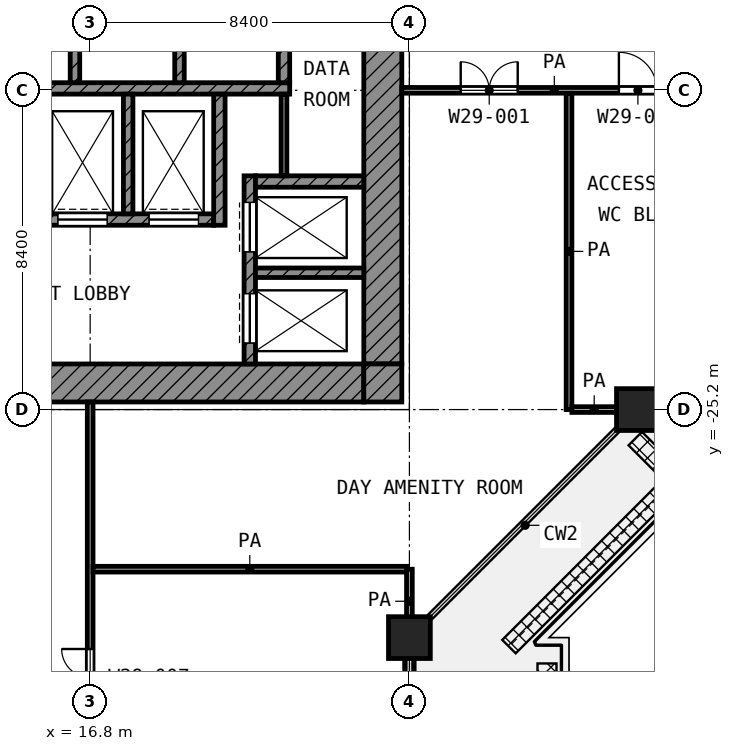
"""IFC4 building model, lengths in metres.
Left out: names, types, materials, properties, quantities, classifications, styles, units other than length and angle.
Written with IfcOpenShell. Run it as: python <this file> out.ifc"""

import sys

from ifc_helpers import new_model, si_unit, direction, frame, frame_2d, origin, origin_2d, place, context, subcontext, project, spatial, rectangle, extrude, element, fill, save


model = new_model("IFC4")
c1 = context("Model", 3, precision=1e-05, world=origin(), true_north=direction((0.0, 1.0)))
c2 = subcontext(c1, "Body", "Model", "MODEL_VIEW")
j1 = project(units=[si_unit("LENGTHUNIT", "METRE"), si_unit("PLANEANGLEUNIT", "RADIAN")], contexts=[c1])
p1 = place(None, origin())
s1 = spatial("IfcSite", under=j1, at=p1, CompositionType="ELEMENT")
p2 = place(p1, origin())
s2 = spatial("IfcBuilding", under=s1, at=p2, CompositionType="ELEMENT")
p3 = place(p2, frame((0.0, 0.0, 149.2)))
s3 = spatial("IfcBuildingStorey", under=s2, at=p3, CompositionType="ELEMENT", Elevation=149.2)
for number, where, z_axis, x_axis in (
    (1, (31.2, -25.2, 0.0), (0.0, 0.0, 1.0), (1.0, 0.0, 0.0)),
    (2, (25.2, -31.2, 0.0), (0.0, 0.0, 1.0), (1.0, 0.0, 0.0)),
):
    element("IfcColumn", number, at=place(p3, frame(where, z_axis=z_axis, x_axis=x_axis)), inside=s3, PredefinedType="COLUMN", context=c2, shape_type="SweptSolid", body=[
        extrude(rectangle(XDim=1.1, YDim=1.1, at=origin_2d()), origin(), (0.0, 0.0, 1.0), 4.2),
    ])
p4 = place(p3, frame((25.2, -34.992, 0.0), z_axis=(0.0, 0.0, 1.0), x_axis=(0.0, 1.0, 0.0)))
e3 = element("IfcWall", 3, at=p4, inside=s3, PredefinedType="SOLIDWALL", context=c2, shape_type="SweptSolid", body=[
    extrude(rectangle(XDim=3.242, YDim=0.25, at=frame_2d((1.621, 0.0))), origin(), (0.0, 0.0, 1.0), 3.58),
])
p5 = place(p4, frame((0.721, 0.0, 0.0)))
e4 = element("IfcOpeningElement", 4, at=p5, cuts=e3, PredefinedType="OPENING", context=c2, shape_type="SweptSolid", body=[
    extrude(rectangle(XDim=1.8, YDim=2.1, at=frame_2d((0.9, 1.05))), frame((0.0, 0.135, 0.0), z_axis=(0.0, -1.0, 0.0), x_axis=(1.0, 0.0, 0.0)), (0.0, 0.0, 1.0), 0.27),
])
p6 = place(p3, frame((24.5, -24.0, 0.0), z_axis=(0.0, 0.0, 1.0), x_axis=(0.0, 1.0, 0.0)))
e5 = element("IfcWall", 5, at=p6, inside=s3, PredefinedType="SHEAR", context=c2, shape_type="SweptSolid", body=[
    extrude(rectangle(XDim=18.6, YDim=1.0, at=frame_2d((9.3, 0.0))), origin(), (0.0, 0.0, 1.0), 3.7),
])
p7 = place(p6, frame((10.5, 0.0, 0.0)))
e6 = element("IfcOpeningElement", 6, at=p7, cuts=e5, PredefinedType="OPENING", context=c2, shape_type="SweptSolid", body=[
    extrude(rectangle(XDim=1.8, YDim=2.1, at=frame_2d((0.9, 1.05))), frame((0.0, 0.51, 0.0), z_axis=(0.0, -1.0, 0.0), x_axis=(1.0, 0.0, 0.0)), (0.0, 0.0, 1.0), 1.02),
])
p8 = place(p3, frame((5.4, -24.5, 0.0), z_axis=(0.0, 0.0, 1.0), x_axis=(1.0, 0.0, 0.0)))
e7 = element("IfcWall", 7, at=p8, inside=s3, PredefinedType="SHEAR", context=c2, shape_type="SweptSolid", body=[
    extrude(rectangle(XDim=18.6, YDim=1.0, at=frame_2d((9.3, 0.0))), origin(), (0.0, 0.0, 1.0), 3.7),
])
p9 = place(p8, frame((6.3, 0.0, 0.0)))
e8 = element("IfcOpeningElement", 8, at=p9, cuts=e7, PredefinedType="OPENING", context=c2, shape_type="SweptSolid", body=[
    extrude(rectangle(XDim=1.8, YDim=2.1, at=frame_2d((0.9, 1.05))), frame((0.0, 0.51, 0.0), z_axis=(0.0, -1.0, 0.0), x_axis=(1.0, 0.0, 0.0)), (0.0, 0.0, 1.0), 1.02),
])
p10 = place(p3, frame((24.5, -25.0, 0.0), z_axis=(0.0, 0.0, 1.0), x_axis=(0.0, 1.0, 0.0)))
e9 = element("IfcWall", 9, at=p10, inside=s3, PredefinedType="SHEAR", context=c2, shape_type="SweptSolid", body=[
    extrude(rectangle(XDim=1.0, YDim=1.0, at=frame_2d((0.5, 0.0))), origin(), (0.0, 0.0, 1.0), 3.7),
])
p11 = place(p3, frame((5.4, -16.75, 0.0), z_axis=(0.0, 0.0, 1.0), x_axis=(1.0, 0.0, 0.0)))
e10 = element("IfcWall", 10, at=p11, inside=s3, PredefinedType="SHEAR", context=c2, shape_type="SweptSolid", body=[
    extrude(rectangle(XDim=16.65, YDim=0.3, at=frame_2d((8.325, 0.0))), origin(), (0.0, 0.0, 1.0), 3.7),
])
p12 = place(p3, frame((5.4, -20.2, 0.0), z_axis=(0.0, 0.0, 1.0), x_axis=(1.0, 0.0, 0.0)))
e11 = element("IfcWall", 11, at=p12, inside=s3, PredefinedType="SHEAR", context=c2, shape_type="SweptSolid", body=[
    extrude(rectangle(XDim=14.65, YDim=0.3, at=frame_2d((7.325, 0.0))), origin(), (0.0, 0.0, 1.0), 3.7),
])
p13 = place(p12, frame((10.55, 0.0, 0.0)))
e12 = element("IfcOpeningElement", 12, at=p13, cuts=e11, PredefinedType="OPENING", context=c2, shape_type="SweptSolid", body=[
    extrude(rectangle(XDim=1.3, YDim=2.1, at=frame_2d((0.65, 1.05))), frame((0.0, 0.16, 0.0), z_axis=(0.0, -1.0, 0.0), x_axis=(1.0, 0.0, 0.0)), (0.0, 0.0, 1.0), 0.32),
])
p14 = place(p12, frame((12.95, 0.0, 0.0)))
e13 = element("IfcOpeningElement", 13, at=p14, cuts=e11, PredefinedType="OPENING", context=c2, shape_type="SweptSolid", body=[
    extrude(rectangle(XDim=1.3, YDim=2.1, at=frame_2d((0.65, 1.05))), frame((0.0, 0.16, 0.0), z_axis=(0.0, -1.0, 0.0), x_axis=(1.0, 0.0, 0.0)), (0.0, 0.0, 1.0), 0.32),
])
p15 = place(p12, frame((0.55, 0.0, 0.0)))
e14 = element("IfcOpeningElement", 14, at=p15, cuts=e11, PredefinedType="OPENING", context=c2, shape_type="SweptSolid", body=[
    extrude(rectangle(XDim=1.3, YDim=2.1, at=frame_2d((0.65, 1.05))), frame((0.0, 0.16, 0.0), z_axis=(0.0, -1.0, 0.0), x_axis=(1.0, 0.0, 0.0)), (0.0, 0.0, 1.0), 0.32),
])
p16 = place(p12, frame((2.95, 0.0, 0.0)))
e15 = element("IfcOpeningElement", 15, at=p16, cuts=e11, PredefinedType="OPENING", context=c2, shape_type="SweptSolid", body=[
    extrude(rectangle(XDim=1.3, YDim=2.1, at=frame_2d((0.65, 1.05))), frame((0.0, 0.16, 0.0), z_axis=(0.0, -1.0, 0.0), x_axis=(1.0, 0.0, 0.0)), (0.0, 0.0, 1.0), 0.32),
])
p17 = place(p12, frame((5.35, 0.0, 0.0)))
e16 = element("IfcOpeningElement", 16, at=p17, cuts=e11, PredefinedType="OPENING", context=c2, shape_type="SweptSolid", body=[
    extrude(rectangle(XDim=0.9, YDim=2.1, at=frame_2d((0.45, 1.05))), frame((0.0, 0.16, 0.0), z_axis=(0.0, -1.0, 0.0), x_axis=(1.0, 0.0, 0.0)), (0.0, 0.0, 1.0), 0.32),
])
p18 = place(p12, frame((7.75, 0.0, 0.0)))
e17 = element("IfcOpeningElement", 17, at=p18, cuts=e11, PredefinedType="OPENING", context=c2, shape_type="SweptSolid", body=[
    extrude(rectangle(XDim=0.9, YDim=2.1, at=frame_2d((0.45, 1.05))), frame((0.0, 0.16, 0.0), z_axis=(0.0, -1.0, 0.0), x_axis=(1.0, 0.0, 0.0)), (0.0, 0.0, 1.0), 0.32),
])
p19 = place(p3, frame((20.2, -20.35, 0.0), z_axis=(0.0, 0.0, 1.0), x_axis=(0.0, 1.0, 0.0)))
e18 = element("IfcWall", 18, at=p19, inside=s3, PredefinedType="SHEAR", context=c2, shape_type="SweptSolid", body=[
    extrude(rectangle(XDim=3.45, YDim=0.3, at=frame_2d((1.725, 0.0))), origin(), (0.0, 0.0, 1.0), 3.7),
])
p20 = place(p3, frame((21.9, -16.6, 0.0), z_axis=(0.0, 0.0, 1.0), x_axis=(0.0, 1.0, 0.0)))
e19 = element("IfcWall", 19, at=p20, inside=s3, PredefinedType="SHEAR", context=c2, shape_type="SweptSolid", body=[
    extrude(rectangle(XDim=2.35, YDim=0.3, at=frame_2d((1.175, 0.0))), origin(), (0.0, 0.0, 1.0), 3.7),
])
p21 = place(p3, frame((21.15, -19.2, 0.0), z_axis=(0.0, 0.0, 1.0), x_axis=(1.0, 0.0, 0.0)))
e20 = element("IfcWall", 20, at=p21, inside=s3, PredefinedType="SHEAR", context=c2, shape_type="SweptSolid", body=[
    extrude(rectangle(XDim=2.85, YDim=0.3, at=frame_2d((1.425, 0.0))), origin(), (0.0, 0.0, 1.0), 3.7),
])
p22 = place(p3, frame((21.0, -24.0, 0.0), z_axis=(0.0, 0.0, 1.0), x_axis=(0.0, 1.0, 0.0)))
e21 = element("IfcWall", 21, at=p22, inside=s3, PredefinedType="SHEAR", context=c2, shape_type="SweptSolid", body=[
    extrude(rectangle(XDim=4.95, YDim=0.3, at=frame_2d((2.475, 0.0))), origin(), (0.0, 0.0, 1.0), 3.7),
])
p23 = place(p22, frame((2.95, 0.0, 0.0)))
e22 = element("IfcOpeningElement", 22, at=p23, cuts=e21, PredefinedType="OPENING", context=c2, shape_type="SweptSolid", body=[
    extrude(rectangle(XDim=1.3, YDim=2.1, at=frame_2d((0.65, 1.05))), frame((0.0, 0.16, 0.0), z_axis=(0.0, -1.0, 0.0), x_axis=(1.0, 0.0, 0.0)), (0.0, 0.0, 1.0), 0.32),
])
p24 = place(p22, frame((0.55, 0.0, 0.0)))
e23 = element("IfcOpeningElement", 23, at=p24, cuts=e21, PredefinedType="OPENING", context=c2, shape_type="SweptSolid", body=[
    extrude(rectangle(XDim=1.3, YDim=2.1, at=frame_2d((0.65, 1.05))), frame((0.0, 0.16, 0.0), z_axis=(0.0, -1.0, 0.0), x_axis=(1.0, 0.0, 0.0)), (0.0, 0.0, 1.0), 0.32),
])
p25 = place(p3, frame((21.15, -21.6, 0.0), z_axis=(0.0, 0.0, 1.0), x_axis=(1.0, 0.0, 0.0)))
e24 = element("IfcWall", 24, at=p25, inside=s3, PredefinedType="SHEAR", context=c2, shape_type="SweptSolid", body=[
    extrude(rectangle(XDim=2.85, YDim=0.25, at=frame_2d((1.425, 0.0))), origin(), (0.0, 0.0, 1.0), 3.7),
])
p26 = place(p3, frame((17.8, -20.05, 0.0), z_axis=(0.0, 0.0, 1.0), x_axis=(0.0, 1.0, 0.0)))
e25 = element("IfcWall", 25, at=p26, inside=s3, PredefinedType="SHEAR", context=c2, shape_type="SweptSolid", body=[
    extrude(rectangle(XDim=3.15, YDim=0.25, at=frame_2d((1.575, 0.0))), origin(), (0.0, 0.0, 1.0), 3.7),
])
for number, where, z_axis, x_axis in (
    (26, (16.4, -16.6, 0.0), (0.0, 0.0, 1.0), (0.0, 1.0, 0.0)),
    (27, (19.15, -16.6, 0.0), (0.0, 0.0, 1.0), (0.0, 1.0, 0.0)),
):
    element("IfcWall", number, at=place(p3, frame(where, z_axis=z_axis, x_axis=x_axis)), inside=s3, PredefinedType="SHEAR", context=c2, shape_type="SweptSolid", body=[
        extrude(rectangle(XDim=2.35, YDim=0.25, at=frame_2d((1.175, 0.0))), origin(), (0.0, 0.0, 1.0), 3.7),
    ])
p27 = place(p3, frame((21.9, -19.05, 0.0), z_axis=(0.0, 0.0, 1.0), x_axis=(0.0, 1.0, 0.0)))
e28 = element("IfcWall", 28, at=p27, inside=s3, PredefinedType="PARTITIONING", context=c2, shape_type="SweptSolid", body=[
    extrude(rectangle(XDim=2.15, YDim=0.15, at=frame_2d((1.075, 0.0))), origin(), (0.0, 0.0, 1.0), 3.7),
])
p28 = place(p3, frame((16.875, -29.4, 0.0), z_axis=(0.0, 0.0, 1.0), x_axis=(1.0, 0.0, 0.0)))
e29 = element("IfcWall", 29, at=p28, inside=s3, PredefinedType="PARTITIONING", context=c2, shape_type="SweptSolid", body=[
    extrude(rectangle(XDim=8.25, YDim=0.15, at=frame_2d((4.125, 0.0))), origin(), (0.0, 0.0, 1.0), 3.7),
])
p29 = place(p3, frame((29.475, -25.2, 0.0), z_axis=(0.0, 0.0, 1.0), x_axis=(1.0, 0.0, 0.0)))
e30 = element("IfcWall", 30, at=p29, inside=s3, PredefinedType="PARTITIONING", context=c2, shape_type="SweptSolid", body=[
    extrude(rectangle(XDim=1.175, YDim=0.15, at=frame_2d((0.587, 0.0))), origin(), (0.0, 0.0, 1.0), 3.7),
])
p30 = place(p3, frame((25.0, -16.8, 0.0), z_axis=(0.0, 0.0, 1.0), x_axis=(1.0, 0.0, 0.0)))
e31 = element("IfcWall", 31, at=p30, inside=s3, PredefinedType="PARTITIONING", context=c2, shape_type="SweptSolid", body=[
    extrude(rectangle(XDim=8.025, YDim=0.15, at=frame_2d((4.012, 0.0))), origin(), (0.0, 0.0, 1.0), 3.7),
])
p31 = place(p30, frame((1.55, 0.0, 0.0)))
e32 = element("IfcOpeningElement", 32, at=p31, cuts=e31, PredefinedType="OPENING", context=c2, shape_type="SweptSolid", body=[
    extrude(rectangle(XDim=1.5, YDim=2.1, at=frame_2d((0.75, 1.05))), frame((0.0, 0.085, 0.0), z_axis=(0.0, -1.0, 0.0), x_axis=(1.0, 0.0, 0.0)), (0.0, 0.0, 1.0), 0.17),
])
p32 = place(p30, frame((5.712, 0.0, 0.0)))
e33 = element("IfcOpeningElement", 33, at=p32, cuts=e31, PredefinedType="OPENING", context=c2, shape_type="SweptSolid", body=[
    extrude(rectangle(XDim=1.0, YDim=2.1, at=frame_2d((0.5, 1.05))), frame((0.0, 0.085, 0.0), z_axis=(0.0, -1.0, 0.0), x_axis=(1.0, 0.0, 0.0)), (0.0, 0.0, 1.0), 0.17),
])
p33 = place(p3, frame((16.8, -58.72, 0.0), z_axis=(0.0, 0.0, 1.0), x_axis=(0.0, 1.0, 0.0)))
e34 = element("IfcWall", 34, at=p33, inside=s3, PredefinedType="PARTITIONING", context=c2, shape_type="SweptSolid", body=[
    extrude(rectangle(XDim=33.72, YDim=0.15, at=frame_2d((16.86, 0.0))), origin(), (0.0, 0.0, 1.0), 3.7),
])
p34 = place(p33, frame((25.72, 0.0, 0.0)))
e35 = element("IfcOpeningElement", 35, at=p34, cuts=e34, PredefinedType="OPENING", context=c2, shape_type="SweptSolid", body=[
    extrude(rectangle(XDim=1.5, YDim=2.1, at=frame_2d((0.75, 1.05))), frame((0.0, 0.085, 0.0), z_axis=(0.0, -1.0, 0.0), x_axis=(1.0, 0.0, 0.0)), (0.0, 0.0, 1.0), 0.17),
])
p35 = place(p33, frame((17.72, 0.0, 0.0)))
e36 = element("IfcOpeningElement", 36, at=p35, cuts=e34, PredefinedType="OPENING", context=c2, shape_type="SweptSolid", body=[
    extrude(rectangle(XDim=1.2, YDim=2.1, at=frame_2d((0.6, 1.05))), frame((0.0, 0.085, 0.0), z_axis=(0.0, -1.0, 0.0), x_axis=(1.0, 0.0, 0.0)), (0.0, 0.0, 1.0), 0.17),
])
p36 = place(p33, frame((14.92, 0.0, 0.0)))
e37 = element("IfcOpeningElement", 37, at=p36, cuts=e34, PredefinedType="OPENING", context=c2, shape_type="SweptSolid", body=[
    extrude(rectangle(XDim=1.2, YDim=2.1, at=frame_2d((0.6, 1.05))), frame((0.0, 0.085, 0.0), z_axis=(0.0, -1.0, 0.0), x_axis=(1.0, 0.0, 0.0)), (0.0, 0.0, 1.0), 0.17),
])
p37 = place(p33, frame((9.02, 0.0, 0.0)))
e38 = element("IfcOpeningElement", 38, at=p37, cuts=e34, PredefinedType="OPENING", context=c2, shape_type="SweptSolid", body=[
    extrude(rectangle(XDim=0.9, YDim=2.1, at=frame_2d((0.45, 1.05))), frame((0.0, 0.085, 0.0), z_axis=(0.0, -1.0, 0.0), x_axis=(1.0, 0.0, 0.0)), (0.0, 0.0, 1.0), 0.17),
])
p38 = place(p33, frame((3.37, 0.0, 0.0)))
e39 = element("IfcOpeningElement", 39, at=p38, cuts=e34, PredefinedType="OPENING", context=c2, shape_type="SweptSolid", body=[
    extrude(rectangle(XDim=1.5, YDim=2.1, at=frame_2d((0.75, 1.05))), frame((0.0, 0.085, 0.0), z_axis=(0.0, -1.0, 0.0), x_axis=(1.0, 0.0, 0.0)), (0.0, 0.0, 1.0), 0.17),
])
p39 = place(p3, frame((25.2, -31.087, 0.0), z_axis=(0.0, 0.0, 1.0), x_axis=(0.0, 1.0, 0.0)))
e40 = element("IfcWall", 40, at=p39, inside=s3, PredefinedType="PARTITIONING", context=c2, shape_type="SweptSolid", body=[
    extrude(rectangle(XDim=1.687, YDim=0.15, at=frame_2d((0.844, 0.0))), origin(), (0.0, 0.0, 1.0), 3.7),
])
p40 = place(p3, frame((29.4, -25.2, 0.0), z_axis=(0.0, 0.0, 1.0), x_axis=(0.0, 1.0, 0.0)))
e41 = element("IfcWall", 41, at=p40, inside=s3, PredefinedType="PARTITIONING", context=c2, shape_type="SweptSolid", body=[
    extrude(rectangle(XDim=8.325, YDim=0.15, at=frame_2d((4.163, 0.0))), origin(), (0.0, 0.0, 1.0), 3.7),
])
p41 = place(p23, origin())
e42 = element("IfcDoor", 42, at=p41, inside=s3, OperationType="DOUBLE_DOOR_SLIDING", PredefinedType="DOOR", context=c2, shape_type="SweptSolid", body=[
    extrude(rectangle(XDim=1.3, YDim=2.1, at=frame_2d((0.65, 1.05))), frame((0.0, 0.025, 0.0), z_axis=(0.0, -1.0, 0.0), x_axis=(1.0, 0.0, 0.0)), (0.0, 0.0, 1.0), 0.05),
])
fill(e22, e42)
p42 = place(p24, origin())
e43 = element("IfcDoor", 43, at=p42, inside=s3, OperationType="DOUBLE_DOOR_SLIDING", PredefinedType="DOOR", context=c2, shape_type="SweptSolid", body=[
    extrude(rectangle(XDim=1.3, YDim=2.1, at=frame_2d((0.65, 1.05))), frame((0.0, 0.025, 0.0), z_axis=(0.0, -1.0, 0.0), x_axis=(1.0, 0.0, 0.0)), (0.0, 0.0, 1.0), 0.05),
])
fill(e23, e43)
p43 = place(p13, origin())
e44 = element("IfcDoor", 44, at=p43, inside=s3, OperationType="DOUBLE_DOOR_SLIDING", PredefinedType="DOOR", context=c2, shape_type="SweptSolid", body=[
    extrude(rectangle(XDim=1.3, YDim=2.1, at=frame_2d((0.65, 1.05))), frame((0.0, 0.025, 0.0), z_axis=(0.0, -1.0, 0.0), x_axis=(1.0, 0.0, 0.0)), (0.0, 0.0, 1.0), 0.05),
])
fill(e12, e44)
p44 = place(p14, origin())
e45 = element("IfcDoor", 45, at=p44, inside=s3, OperationType="DOUBLE_DOOR_SLIDING", PredefinedType="DOOR", context=c2, shape_type="SweptSolid", body=[
    extrude(rectangle(XDim=1.3, YDim=2.1, at=frame_2d((0.65, 1.05))), frame((0.0, 0.025, 0.0), z_axis=(0.0, -1.0, 0.0), x_axis=(1.0, 0.0, 0.0)), (0.0, 0.0, 1.0), 0.05),
])
fill(e13, e45)
p45 = place(p31, origin())
e46 = element("IfcDoor", 46, at=p45, inside=s3, OperationType="DOUBLE_DOOR_SINGLE_SWING", PredefinedType="DOOR", context=c2, shape_type="SweptSolid", body=[
    extrude(rectangle(XDim=1.5, YDim=2.1, at=frame_2d((0.75, 1.05))), frame((0.0, 0.025, 0.0), z_axis=(0.0, -1.0, 0.0), x_axis=(1.0, 0.0, 0.0)), (0.0, 0.0, 1.0), 0.05),
])
fill(e32, e46)
p46 = place(p32, origin())
e47 = element("IfcDoor", 47, at=p46, inside=s3, OperationType="SINGLE_SWING_LEFT", PredefinedType="DOOR", context=c2, shape_type="SweptSolid", body=[
    extrude(rectangle(XDim=1.0, YDim=2.1, at=frame_2d((0.5, 1.05))), frame((0.0, 0.025, 0.0), z_axis=(0.0, -1.0, 0.0), x_axis=(1.0, 0.0, 0.0)), (0.0, 0.0, 1.0), 0.05),
])
fill(e33, e47)
p47 = place(p34, origin())
e48 = element("IfcDoor", 48, at=p47, inside=s3, OperationType="DOUBLE_DOOR_SINGLE_SWING", PredefinedType="DOOR", context=c2, shape_type="SweptSolid", body=[
    extrude(rectangle(XDim=1.5, YDim=2.1, at=frame_2d((0.75, 1.05))), frame((0.0, 0.025, 0.0), z_axis=(0.0, -1.0, 0.0), x_axis=(1.0, 0.0, 0.0)), (0.0, 0.0, 1.0), 0.05),
])
fill(e35, e48)
save(model, sys.argv[1])
